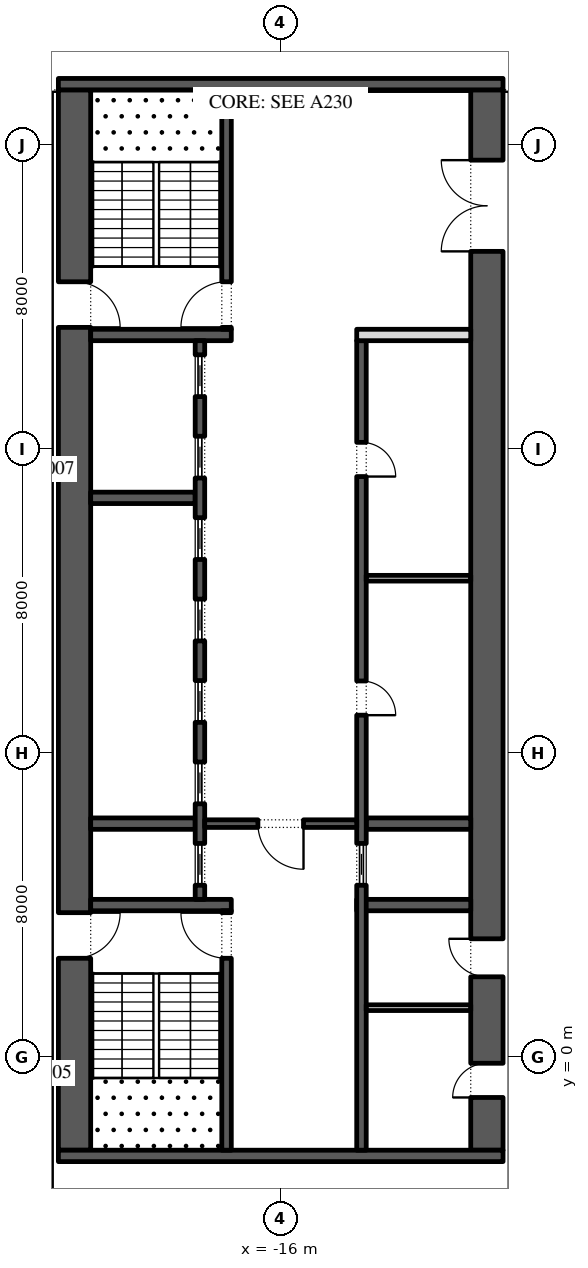
"""IFC4 building model, lengths in metres.
Left out: names, types, materials, properties, quantities, classifications, styles, units other than length and angle.
Written with IfcOpenShell. Run it as: python <this file> out.ifc"""

import sys

from ifc_helpers import new_model, si_unit, direction, frame, frame_2d, origin, place, context, subcontext, project, spatial, rectangle, extrude, element, fill, save


model = new_model("IFC4")
c1 = context("Model", 3, precision=1e-05, world=origin(), true_north=direction((0.0, 1.0)))
c2 = subcontext(c1, "Body", "Model", "MODEL_VIEW")
j1 = project(units=[si_unit("LENGTHUNIT", "METRE"), si_unit("PLANEANGLEUNIT", "RADIAN")], contexts=[c1])
p1 = place(None, origin())
s1 = spatial("IfcSite", under=j1, at=p1, CompositionType="ELEMENT")
p2 = place(p1, origin())
s2 = spatial("IfcBuilding", under=s1, at=p2, CompositionType="ELEMENT")
p3 = place(p2, frame((0.0, 0.0, 126.6)))
s3 = spatial("IfcBuildingStorey", under=s2, at=p3, CompositionType="ELEMENT", Elevation=126.6)
p4 = place(p3, frame((-21.425, -2.45, 0.0), z_axis=(0.0, 0.0, 1.0), x_axis=(0.0, 1.0, 0.0)))
e1 = element("IfcWall", 1, at=p4, inside=s3, PredefinedType="SHEAR", context=c2, shape_type="SweptSolid", body=[
    extrude(rectangle(XDim=27.9, YDim=0.85, at=frame_2d((13.95, 0.0))), origin(), (0.0, 0.0, 1.0), 4.0),
])
p5 = place(p4, frame((5.05, 0.0, 0.0)))
e2 = element("IfcOpeningElement", 2, at=p5, cuts=e1, PredefinedType="OPENING", context=c2, shape_type="SweptSolid", body=[
    extrude(rectangle(XDim=1.2, YDim=2.1, at=frame_2d((0.6, 1.05))), frame((0.0, 0.435, 0.0), z_axis=(0.0, -1.0, 0.0), x_axis=(1.0, 0.0, 0.0)), (0.0, 0.0, 1.0), 0.87),
])
p6 = place(p4, frame((21.65, 0.0, 0.0)))
e3 = element("IfcOpeningElement", 3, at=p6, cuts=e1, PredefinedType="OPENING", context=c2, shape_type="SweptSolid", body=[
    extrude(rectangle(XDim=1.2, YDim=2.1, at=frame_2d((0.6, 1.05))), frame((0.0, 0.435, 0.0), z_axis=(0.0, -1.0, 0.0), x_axis=(1.0, 0.0, 0.0)), (0.0, 0.0, 1.0), 0.87),
])
p7 = place(p3, frame((-10.575, -2.45, 0.0), z_axis=(0.0, 0.0, 1.0), x_axis=(0.0, 1.0, 0.0)))
e4 = element("IfcWall", 4, at=p7, inside=s3, PredefinedType="SHEAR", context=c2, shape_type="SweptSolid", body=[
    extrude(rectangle(XDim=27.9, YDim=0.85, at=frame_2d((13.95, 0.0))), origin(), (0.0, 0.0, 1.0), 4.0),
])
p8 = place(p7, frame((23.65, 0.0, 0.0)))
e5 = element("IfcOpeningElement", 5, at=p8, cuts=e4, PredefinedType="OPENING", context=c2, shape_type="SweptSolid", body=[
    extrude(rectangle(XDim=2.4, YDim=2.1, at=frame_2d((1.2, 1.05))), frame((0.0, 0.435, 0.0), z_axis=(0.0, -1.0, 0.0), x_axis=(1.0, 0.0, 0.0)), (0.0, 0.0, 1.0), 0.87),
])
p9 = place(p7, frame((1.387, 0.0, 0.0)))
e6 = element("IfcOpeningElement", 6, at=p9, cuts=e4, PredefinedType="OPENING", context=c2, shape_type="SweptSolid", body=[
    extrude(rectangle(XDim=0.9, YDim=2.1, at=frame_2d((0.45, 1.05))), frame((0.0, 0.435, 0.0), z_axis=(0.0, -1.0, 0.0), x_axis=(1.0, 0.0, 0.0)), (0.0, 0.0, 1.0), 0.87),
])
p10 = place(p7, frame((4.562, 0.0, 0.0)))
e7 = element("IfcOpeningElement", 7, at=p10, cuts=e4, PredefinedType="OPENING", context=c2, shape_type="SweptSolid", body=[
    extrude(rectangle(XDim=1.0, YDim=2.1, at=frame_2d((0.5, 1.05))), frame((0.0, 0.435, 0.0), z_axis=(0.0, -1.0, 0.0), x_axis=(1.0, 0.0, 0.0)), (0.0, 0.0, 1.0), 0.87),
])
for number, where, z_axis, x_axis in (
    (8, (-21.85, -2.6, 0.0), (0.0, 0.0, 1.0), (1.0, 0.0, 0.0)),
    (9, (-21.85, 25.6, 0.0), (0.0, 0.0, 1.0), (1.0, 0.0, 0.0)),
):
    element("IfcWall", number, at=place(p3, frame(where, z_axis=z_axis, x_axis=x_axis)), inside=s3, PredefinedType="SHEAR", context=c2, shape_type="SweptSolid", body=[
        extrude(rectangle(XDim=11.7, YDim=0.3, at=frame_2d((5.85, 0.0))), origin(), (0.0, 0.0, 1.0), 4.0),
    ])
p11 = place(p3, frame((-21.0, 4.0, 0.0), z_axis=(0.0, 0.0, 1.0), x_axis=(1.0, 0.0, 0.0)))
e10 = element("IfcWall", 10, at=p11, inside=s3, PredefinedType="SHEAR", context=c2, shape_type="SweptSolid", body=[
    extrude(rectangle(XDim=3.7, YDim=0.3, at=frame_2d((1.85, 0.0))), origin(), (0.0, 0.0, 1.0), 4.0),
])
p12 = place(p3, frame((-17.425, -2.45, 0.0), z_axis=(0.0, 0.0, 1.0), x_axis=(0.0, 1.0, 0.0)))
e11 = element("IfcWall", 11, at=p12, inside=s3, PredefinedType="SHEAR", context=c2, shape_type="SweptSolid", body=[
    extrude(rectangle(XDim=6.3, YDim=0.25, at=frame_2d((3.15, 0.0))), origin(), (0.0, 0.0, 1.0), 4.0),
])
p13 = place(p12, frame((5.05, 0.0, 0.0)))
e12 = element("IfcOpeningElement", 12, at=p13, cuts=e11, PredefinedType="OPENING", context=c2, shape_type="SweptSolid", body=[
    extrude(rectangle(XDim=1.2, YDim=2.1, at=frame_2d((0.6, 1.05))), frame((0.0, 0.135, 0.0), z_axis=(0.0, -1.0, 0.0), x_axis=(1.0, 0.0, 0.0)), (0.0, 0.0, 1.0), 0.27),
])
p14 = place(p3, frame((-21.0, 19.0, 0.0), z_axis=(0.0, 0.0, 1.0), x_axis=(1.0, 0.0, 0.0)))
e13 = element("IfcWall", 13, at=p14, inside=s3, PredefinedType="SHEAR", context=c2, shape_type="SweptSolid", body=[
    extrude(rectangle(XDim=3.7, YDim=0.3, at=frame_2d((1.85, 0.0))), origin(), (0.0, 0.0, 1.0), 4.0),
])
p15 = place(p3, frame((-17.425, 19.15, 0.0), z_axis=(0.0, 0.0, 1.0), x_axis=(0.0, 1.0, 0.0)))
e14 = element("IfcWall", 14, at=p15, inside=s3, PredefinedType="SHEAR", context=c2, shape_type="SweptSolid", body=[
    extrude(rectangle(XDim=6.3, YDim=0.25, at=frame_2d((3.15, 0.0))), origin(), (0.0, 0.0, 1.0), 4.0),
])
p16 = place(p15, frame((0.05, 0.0, 0.0)))
e15 = element("IfcOpeningElement", 15, at=p16, cuts=e14, PredefinedType="OPENING", context=c2, shape_type="SweptSolid", body=[
    extrude(rectangle(XDim=1.2, YDim=2.1, at=frame_2d((0.6, 1.05))), frame((0.0, 0.135, 0.0), z_axis=(0.0, -1.0, 0.0), x_axis=(1.0, 0.0, 0.0)), (0.0, 0.0, 1.0), 0.27),
])
for number, where, z_axis, x_axis in (
    (16, (-21.0, 6.143, 0.0), (0.0, 0.0, 1.0), (1.0, 0.0, 0.0)),
    (17, (-21.0, 14.714, 0.0), (0.0, 0.0, 1.0), (1.0, 0.0, 0.0)),
):
    element("IfcWall", number, at=place(p3, frame(where, z_axis=z_axis, x_axis=x_axis)), inside=s3, PredefinedType="SHEAR", context=c2, shape_type="SweptSolid", body=[
        extrude(rectangle(XDim=2.75, YDim=0.3, at=frame_2d((1.375, 0.0))), origin(), (0.0, 0.0, 1.0), 4.0),
    ])
p17 = place(p3, frame((-18.125, 4.15, 0.0), z_axis=(0.0, 0.0, 1.0), x_axis=(0.0, 1.0, 0.0)))
e18 = element("IfcWall", 18, at=p17, inside=s3, PredefinedType="SHEAR", context=c2, shape_type="SweptSolid", body=[
    extrude(rectangle(XDim=14.7, YDim=0.25, at=frame_2d((7.35, 0.0))), origin(), (0.0, 0.0, 1.0), 4.0),
])
p18 = place(p17, frame((0.371, 0.0, 0.0)))
e19 = element("IfcOpeningElement", 19, at=p18, cuts=e18, PredefinedType="OPENING", context=c2, shape_type="SweptSolid", body=[
    extrude(rectangle(XDim=1.1, YDim=2.1, at=frame_2d((0.55, 1.05))), frame((0.0, 0.135, 0.0), z_axis=(0.0, -1.0, 0.0), x_axis=(1.0, 0.0, 0.0)), (0.0, 0.0, 1.0), 0.27),
])
p19 = place(p17, frame((2.514, 0.0, 0.0)))
e20 = element("IfcOpeningElement", 20, at=p19, cuts=e18, PredefinedType="OPENING", context=c2, shape_type="SweptSolid", body=[
    extrude(rectangle(XDim=1.1, YDim=2.1, at=frame_2d((0.55, 1.05))), frame((0.0, 0.135, 0.0), z_axis=(0.0, -1.0, 0.0), x_axis=(1.0, 0.0, 0.0)), (0.0, 0.0, 1.0), 0.27),
])
p20 = place(p17, frame((4.657, 0.0, 0.0)))
e21 = element("IfcOpeningElement", 21, at=p20, cuts=e18, PredefinedType="OPENING", context=c2, shape_type="SweptSolid", body=[
    extrude(rectangle(XDim=1.1, YDim=2.1, at=frame_2d((0.55, 1.05))), frame((0.0, 0.135, 0.0), z_axis=(0.0, -1.0, 0.0), x_axis=(1.0, 0.0, 0.0)), (0.0, 0.0, 1.0), 0.27),
])
p21 = place(p17, frame((6.8, 0.0, 0.0)))
e22 = element("IfcOpeningElement", 22, at=p21, cuts=e18, PredefinedType="OPENING", context=c2, shape_type="SweptSolid", body=[
    extrude(rectangle(XDim=1.1, YDim=2.1, at=frame_2d((0.55, 1.05))), frame((0.0, 0.135, 0.0), z_axis=(0.0, -1.0, 0.0), x_axis=(1.0, 0.0, 0.0)), (0.0, 0.0, 1.0), 0.27),
])
p22 = place(p17, frame((8.943, 0.0, 0.0)))
e23 = element("IfcOpeningElement", 23, at=p22, cuts=e18, PredefinedType="OPENING", context=c2, shape_type="SweptSolid", body=[
    extrude(rectangle(XDim=1.1, YDim=2.1, at=frame_2d((0.55, 1.05))), frame((0.0, 0.135, 0.0), z_axis=(0.0, -1.0, 0.0), x_axis=(1.0, 0.0, 0.0)), (0.0, 0.0, 1.0), 0.27),
])
p23 = place(p17, frame((11.086, 0.0, 0.0)))
e24 = element("IfcOpeningElement", 24, at=p23, cuts=e18, PredefinedType="OPENING", context=c2, shape_type="SweptSolid", body=[
    extrude(rectangle(XDim=1.1, YDim=2.1, at=frame_2d((0.55, 1.05))), frame((0.0, 0.135, 0.0), z_axis=(0.0, -1.0, 0.0), x_axis=(1.0, 0.0, 0.0)), (0.0, 0.0, 1.0), 0.27),
])
p24 = place(p17, frame((13.229, 0.0, 0.0)))
e25 = element("IfcOpeningElement", 25, at=p24, cuts=e18, PredefinedType="OPENING", context=c2, shape_type="SweptSolid", body=[
    extrude(rectangle(XDim=1.1, YDim=2.1, at=frame_2d((0.55, 1.05))), frame((0.0, 0.135, 0.0), z_axis=(0.0, -1.0, 0.0), x_axis=(1.0, 0.0, 0.0)), (0.0, 0.0, 1.0), 0.27),
])
p25 = place(p3, frame((-14.0, 4.0, 0.0), z_axis=(0.0, 0.0, 1.0), x_axis=(1.0, 0.0, 0.0)))
e26 = element("IfcWall", 26, at=p25, inside=s3, PredefinedType="SHEAR", context=c2, shape_type="SweptSolid", body=[
    extrude(rectangle(XDim=3.0, YDim=0.3, at=frame_2d((1.5, 0.0))), origin(), (0.0, 0.0, 1.0), 4.0),
])
p26 = place(p3, frame((-13.75, 6.143, 0.0), z_axis=(0.0, 0.0, 1.0), x_axis=(1.0, 0.0, 0.0)))
e27 = element("IfcWall", 27, at=p26, inside=s3, PredefinedType="SHEAR", context=c2, shape_type="SweptSolid", body=[
    extrude(rectangle(XDim=2.75, YDim=0.3, at=frame_2d((1.375, 0.0))), origin(), (0.0, 0.0, 1.0), 4.0),
])
p27 = place(p3, frame((-13.875, -2.45, 0.0), z_axis=(0.0, 0.0, 1.0), x_axis=(0.0, 1.0, 0.0)))
e28 = element("IfcWall", 28, at=p27, inside=s3, PredefinedType="SHEAR", context=c2, shape_type="SweptSolid", body=[
    extrude(rectangle(XDim=21.3, YDim=0.25, at=frame_2d((10.65, 0.0))), origin(), (0.0, 0.0, 1.0), 4.0),
])
p28 = place(p27, frame((11.446, 0.0, 0.0)))
e29 = element("IfcOpeningElement", 29, at=p28, cuts=e28, PredefinedType="OPENING", context=c2, shape_type="SweptSolid", body=[
    extrude(rectangle(XDim=0.9, YDim=2.1, at=frame_2d((0.45, 1.05))), frame((0.0, 0.135, 0.0), z_axis=(0.0, -1.0, 0.0), x_axis=(1.0, 0.0, 0.0)), (0.0, 0.0, 1.0), 0.27),
])
p29 = place(p27, frame((17.725, 0.0, 0.0)))
e30 = element("IfcOpeningElement", 30, at=p29, cuts=e28, PredefinedType="OPENING", context=c2, shape_type="SweptSolid", body=[
    extrude(rectangle(XDim=0.9, YDim=2.1, at=frame_2d((0.45, 1.05))), frame((0.0, 0.135, 0.0), z_axis=(0.0, -1.0, 0.0), x_axis=(1.0, 0.0, 0.0)), (0.0, 0.0, 1.0), 0.27),
])
p30 = place(p27, frame((6.971, 0.0, 0.0)))
e31 = element("IfcOpeningElement", 31, at=p30, cuts=e28, PredefinedType="OPENING", context=c2, shape_type="SweptSolid", body=[
    extrude(rectangle(XDim=1.1, YDim=2.1, at=frame_2d((0.55, 1.05))), frame((0.0, 0.135, 0.0), z_axis=(0.0, -1.0, 0.0), x_axis=(1.0, 0.0, 0.0)), (0.0, 0.0, 1.0), 0.27),
])
p31 = place(p3, frame((-14.0, 19.0, 0.0), z_axis=(0.0, 0.0, 1.0), x_axis=(1.0, 0.0, 0.0)))
e32 = element("IfcWall", 32, at=p31, inside=s3, PredefinedType="PARTITIONING", context=c2, shape_type="SweptSolid", body=[
    extrude(rectangle(XDim=3.0, YDim=0.3, at=frame_2d((1.5, 0.0))), origin(), (0.0, 0.0, 1.0), 4.0),
])
p32 = place(p3, frame((-13.75, 12.6, 0.0), z_axis=(0.0, 0.0, 1.0), x_axis=(1.0, 0.0, 0.0)))
e33 = element("IfcWall", 33, at=p32, inside=s3, PredefinedType="PARTITIONING", context=c2, shape_type="SweptSolid", body=[
    extrude(rectangle(XDim=2.75, YDim=0.15, at=frame_2d((1.375, 0.0))), origin(), (0.0, 0.0, 1.0), 4.0),
])
p33 = place(p3, frame((-18.0, 6.143, 0.0), z_axis=(0.0, 0.0, 1.0), x_axis=(1.0, 0.0, 0.0)))
e34 = element("IfcWall", 34, at=p33, inside=s3, PredefinedType="SHEAR", context=c2, shape_type="SweptSolid", body=[
    extrude(rectangle(XDim=4.0, YDim=0.2, at=frame_2d((2.0, 0.0))), origin(), (0.0, 0.0, 1.0), 4.0),
])
p34 = place(p33, frame((1.4, 0.0, 0.0)))
e35 = element("IfcOpeningElement", 35, at=p34, cuts=e34, PredefinedType="OPENING", context=c2, shape_type="SweptSolid", body=[
    extrude(rectangle(XDim=1.2, YDim=2.1, at=frame_2d((0.6, 1.05))), frame((0.0, 0.11, 0.0), z_axis=(0.0, -1.0, 0.0), x_axis=(1.0, 0.0, 0.0)), (0.0, 0.0, 1.0), 0.22),
])
p35 = place(p3, frame((-13.75, 1.3, 0.0), z_axis=(0.0, 0.0, 1.0), x_axis=(1.0, 0.0, 0.0)))
e36 = element("IfcWall", 36, at=p35, inside=s3, PredefinedType="PARTITIONING", context=c2, shape_type="SweptSolid", body=[
    extrude(rectangle(XDim=2.75, YDim=0.15, at=frame_2d((1.375, 0.0))), origin(), (0.0, 0.0, 1.0), 4.0),
])
p36 = place(p18, origin())
e37 = element("IfcDoor", 37, at=p36, inside=s3, OperationType="SLIDING_TO_LEFT", PredefinedType="DOOR", context=c2, shape_type="SweptSolid", body=[
    extrude(rectangle(XDim=1.1, YDim=2.1, at=frame_2d((0.55, 1.05))), frame((0.0, 0.025, 0.0), z_axis=(0.0, -1.0, 0.0), x_axis=(1.0, 0.0, 0.0)), (0.0, 0.0, 1.0), 0.05),
])
fill(e19, e37)
p37 = place(p19, origin())
e38 = element("IfcDoor", 38, at=p37, inside=s3, OperationType="SLIDING_TO_LEFT", PredefinedType="DOOR", context=c2, shape_type="SweptSolid", body=[
    extrude(rectangle(XDim=1.1, YDim=2.1, at=frame_2d((0.55, 1.05))), frame((0.0, 0.025, 0.0), z_axis=(0.0, -1.0, 0.0), x_axis=(1.0, 0.0, 0.0)), (0.0, 0.0, 1.0), 0.05),
])
fill(e20, e38)
p38 = place(p20, origin())
e39 = element("IfcDoor", 39, at=p38, inside=s3, OperationType="SLIDING_TO_LEFT", PredefinedType="DOOR", context=c2, shape_type="SweptSolid", body=[
    extrude(rectangle(XDim=1.1, YDim=2.1, at=frame_2d((0.55, 1.05))), frame((0.0, 0.025, 0.0), z_axis=(0.0, -1.0, 0.0), x_axis=(1.0, 0.0, 0.0)), (0.0, 0.0, 1.0), 0.05),
])
fill(e21, e39)
p39 = place(p21, origin())
e40 = element("IfcDoor", 40, at=p39, inside=s3, OperationType="SLIDING_TO_LEFT", PredefinedType="DOOR", context=c2, shape_type="SweptSolid", body=[
    extrude(rectangle(XDim=1.1, YDim=2.1, at=frame_2d((0.55, 1.05))), frame((0.0, 0.025, 0.0), z_axis=(0.0, -1.0, 0.0), x_axis=(1.0, 0.0, 0.0)), (0.0, 0.0, 1.0), 0.05),
])
fill(e22, e40)
p40 = place(p22, origin())
e41 = element("IfcDoor", 41, at=p40, inside=s3, OperationType="SLIDING_TO_LEFT", PredefinedType="DOOR", context=c2, shape_type="SweptSolid", body=[
    extrude(rectangle(XDim=1.1, YDim=2.1, at=frame_2d((0.55, 1.05))), frame((0.0, 0.025, 0.0), z_axis=(0.0, -1.0, 0.0), x_axis=(1.0, 0.0, 0.0)), (0.0, 0.0, 1.0), 0.05),
])
fill(e23, e41)
p41 = place(p23, origin())
e42 = element("IfcDoor", 42, at=p41, inside=s3, OperationType="SLIDING_TO_LEFT", PredefinedType="DOOR", context=c2, shape_type="SweptSolid", body=[
    extrude(rectangle(XDim=1.1, YDim=2.1, at=frame_2d((0.55, 1.05))), frame((0.0, 0.025, 0.0), z_axis=(0.0, -1.0, 0.0), x_axis=(1.0, 0.0, 0.0)), (0.0, 0.0, 1.0), 0.05),
])
fill(e24, e42)
p42 = place(p24, origin())
e43 = element("IfcDoor", 43, at=p42, inside=s3, OperationType="SLIDING_TO_LEFT", PredefinedType="DOOR", context=c2, shape_type="SweptSolid", body=[
    extrude(rectangle(XDim=1.1, YDim=2.1, at=frame_2d((0.55, 1.05))), frame((0.0, 0.025, 0.0), z_axis=(0.0, -1.0, 0.0), x_axis=(1.0, 0.0, 0.0)), (0.0, 0.0, 1.0), 0.05),
])
fill(e25, e43)
p43 = place(p28, frame((0.9, -0.2, 0.0), z_axis=(0.0, 0.0, 1.0), x_axis=(-1.0, 0.0, 0.0)))
e44 = element("IfcDoor", 44, at=p43, inside=s3, OperationType="SINGLE_SWING_LEFT", PredefinedType="DOOR", context=c2, shape_type="SweptSolid", body=[
    extrude(rectangle(XDim=0.9, YDim=2.1, at=frame_2d((0.45, 1.05))), frame((0.0, -0.075, 0.0), z_axis=(0.0, -1.0, 0.0), x_axis=(1.0, 0.0, 0.0)), (0.0, 0.0, 1.0), 0.05),
])
fill(e29, e44)
p44 = place(p29, frame((0.9, -0.2, 0.0), z_axis=(0.0, 0.0, 1.0), x_axis=(-1.0, 0.0, 0.0)))
e45 = element("IfcDoor", 45, at=p44, inside=s3, OperationType="SINGLE_SWING_LEFT", PredefinedType="DOOR", context=c2, shape_type="SweptSolid", body=[
    extrude(rectangle(XDim=0.9, YDim=2.1, at=frame_2d((0.45, 1.05))), frame((0.0, -0.075, 0.0), z_axis=(0.0, -1.0, 0.0), x_axis=(1.0, 0.0, 0.0)), (0.0, 0.0, 1.0), 0.05),
])
fill(e30, e45)
p45 = place(p30, origin())
e46 = element("IfcDoor", 46, at=p45, inside=s3, OperationType="SLIDING_TO_LEFT", PredefinedType="DOOR", context=c2, shape_type="SweptSolid", body=[
    extrude(rectangle(XDim=1.1, YDim=2.1, at=frame_2d((0.55, 1.05))), frame((0.0, 0.025, 0.0), z_axis=(0.0, -1.0, 0.0), x_axis=(1.0, 0.0, 0.0)), (0.0, 0.0, 1.0), 0.05),
])
fill(e31, e46)
p46 = place(p34, frame((1.2, 0.0, 0.0), z_axis=(0.0, 0.0, 1.0), x_axis=(-1.0, 0.0, 0.0)))
e47 = element("IfcDoor", 47, at=p46, inside=s3, OperationType="SINGLE_SWING_RIGHT", PredefinedType="DOOR", context=c2, shape_type="SweptSolid", body=[
    extrude(rectangle(XDim=1.2, YDim=2.1, at=frame_2d((0.6, 1.05))), frame((0.0, 0.025, 0.0), z_axis=(0.0, -1.0, 0.0), x_axis=(1.0, 0.0, 0.0)), (0.0, 0.0, 1.0), 0.05),
])
fill(e35, e47)
p47 = place(p8, origin())
e48 = element("IfcDoor", 48, at=p47, inside=s3, OperationType="DOUBLE_DOOR_SINGLE_SWING", PredefinedType="DOOR", context=c2, shape_type="SweptSolid", body=[
    extrude(rectangle(XDim=2.4, YDim=2.1, at=frame_2d((1.2, 1.05))), frame((0.0, 0.025, 0.0), z_axis=(0.0, -1.0, 0.0), x_axis=(1.0, 0.0, 0.0)), (0.0, 0.0, 1.0), 0.05),
])
fill(e5, e48)
p48 = place(p13, origin())
e49 = element("IfcDoor", 49, at=p48, inside=s3, OperationType="SINGLE_SWING_LEFT", PredefinedType="DOOR", context=c2, shape_type="SweptSolid", body=[
    extrude(rectangle(XDim=1.2, YDim=2.1, at=frame_2d((0.6, 1.05))), frame((0.0, 0.025, 0.0), z_axis=(0.0, -1.0, 0.0), x_axis=(1.0, 0.0, 0.0)), (0.0, 0.0, 1.0), 0.05),
])
fill(e12, e49)
p49 = place(p5, frame((1.2, 0.0, 0.0), z_axis=(0.0, 0.0, 1.0), x_axis=(-1.0, 0.0, 0.0)))
e50 = element("IfcDoor", 50, at=p49, inside=s3, OperationType="SINGLE_SWING_RIGHT", PredefinedType="DOOR", context=c2, shape_type="SweptSolid", body=[
    extrude(rectangle(XDim=1.2, YDim=2.1, at=frame_2d((0.6, 1.05))), frame((0.0, 0.025, 0.0), z_axis=(0.0, -1.0, 0.0), x_axis=(1.0, 0.0, 0.0)), (0.0, 0.0, 1.0), 0.05),
])
fill(e2, e50)
p50 = place(p16, origin())
e51 = element("IfcDoor", 51, at=p50, inside=s3, OperationType="SINGLE_SWING_RIGHT", PredefinedType="DOOR", context=c2, shape_type="SweptSolid", body=[
    extrude(rectangle(XDim=1.2, YDim=2.1, at=frame_2d((0.6, 1.05))), frame((0.0, 0.025, 0.0), z_axis=(0.0, -1.0, 0.0), x_axis=(1.0, 0.0, 0.0)), (0.0, 0.0, 1.0), 0.05),
])
fill(e15, e51)
p51 = place(p6, frame((1.2, 0.0, 0.0), z_axis=(0.0, 0.0, 1.0), x_axis=(-1.0, 0.0, 0.0)))
e52 = element("IfcDoor", 52, at=p51, inside=s3, OperationType="SINGLE_SWING_LEFT", PredefinedType="DOOR", context=c2, shape_type="SweptSolid", body=[
    extrude(rectangle(XDim=1.2, YDim=2.1, at=frame_2d((0.6, 1.05))), frame((0.0, 0.025, 0.0), z_axis=(0.0, -1.0, 0.0), x_axis=(1.0, 0.0, 0.0)), (0.0, 0.0, 1.0), 0.05),
])
fill(e3, e52)
p52 = place(p9, origin())
e53 = element("IfcDoor", 53, at=p52, inside=s3, OperationType="SINGLE_SWING_RIGHT", PredefinedType="DOOR", context=c2, shape_type="SweptSolid", body=[
    extrude(rectangle(XDim=0.9, YDim=2.1, at=frame_2d((0.45, 1.05))), frame((0.0, 0.425, 0.0), z_axis=(0.0, -1.0, 0.0), x_axis=(1.0, 0.0, 0.0)), (0.0, 0.0, 1.0), 0.05),
])
fill(e6, e53)
p53 = place(p10, origin())
e54 = element("IfcDoor", 54, at=p53, inside=s3, OperationType="SINGLE_SWING_LEFT", PredefinedType="DOOR", context=c2, shape_type="SweptSolid", body=[
    extrude(rectangle(XDim=1.0, YDim=2.1, at=frame_2d((0.5, 1.05))), frame((0.0, 0.425, 0.0), z_axis=(0.0, -1.0, 0.0), x_axis=(1.0, 0.0, 0.0)), (0.0, 0.0, 1.0), 0.05),
])
fill(e7, e54)
save(model, sys.argv[1])
